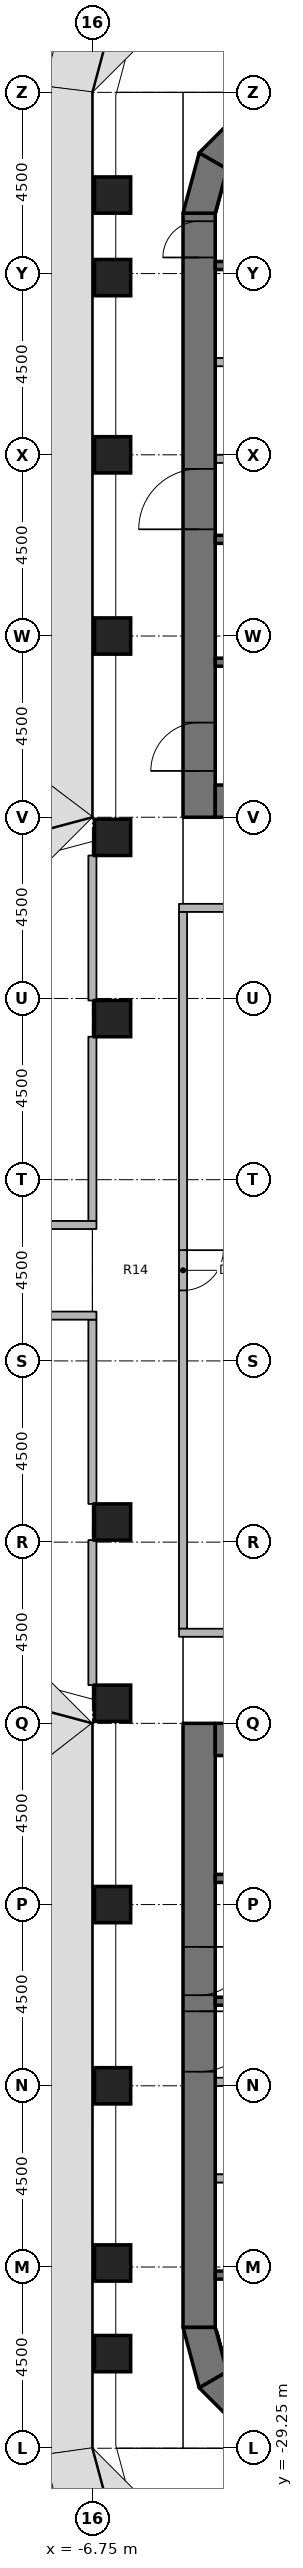
"""IFC4 building model, lengths in metres.
Left out: names, types, materials, properties, quantities, classifications, styles, units other than length and angle.
Written with IfcOpenShell. Run it as: python <this file> out.ifc"""

import sys

from ifc_helpers import new_model, si_unit, direction, frame, frame_2d, origin, origin_2d, place, context, subcontext, project, spatial, polyline, rectangle, outline, extrude, element, fill, save


model = new_model("IFC4")
c1 = context("Model", 3, precision=1e-05, world=origin(), true_north=direction((0.0, 1.0)))
c2 = subcontext(c1, "Body", "Model", "MODEL_VIEW")
j1 = project(units=[si_unit("LENGTHUNIT", "METRE"), si_unit("PLANEANGLEUNIT", "RADIAN")], contexts=[c1])
p1 = place(None, origin())
s1 = spatial("IfcSite", under=j1, at=p1, CompositionType="ELEMENT")
p2 = place(p1, origin())
s2 = spatial("IfcBuilding", under=s1, at=p2, CompositionType="ELEMENT")
p3 = place(p2, frame((0.0, 0.0, 86.6)))
s3 = spatial("IfcBuildingStorey", under=s2, at=p3, CompositionType="ELEMENT", Elevation=86.6)
for number, where, z_axis, x_axis in (
    (1, (-6.25, -26.9, 0.0), (0.0, 0.0, 1.0), (1.0, 0.0, 0.0)),
    (2, (-6.25, -24.65, 0.0), (0.0, 0.0, 1.0), (1.0, 0.0, 0.0)),
    (3, (-6.25, -20.25, 0.0), (0.0, 0.0, 1.0), (1.0, 0.0, 0.0)),
    (4, (-6.25, -15.75, 0.0), (0.0, 0.0, 1.0), (1.0, 0.0, 0.0)),
    (5, (-6.25, -10.75, 0.0), (0.0, 0.0, 1.0), (1.0, 0.0, 0.0)),
    (6, (-6.25, -6.25, 0.0), (0.0, 0.0, 1.0), (1.0, 0.0, 0.0)),
    (7, (-6.25, 6.25, 0.0), (0.0, 0.0, 1.0), (1.0, 0.0, 0.0)),
    (8, (-6.25, 10.75, 0.0), (0.0, 0.0, 1.0), (1.0, 0.0, 0.0)),
    (9, (-6.25, 15.75, 0.0), (0.0, 0.0, 1.0), (1.0, 0.0, 0.0)),
    (10, (-6.25, 20.25, 0.0), (0.0, 0.0, 1.0), (1.0, 0.0, 0.0)),
    (11, (-6.25, 24.65, 0.0), (0.0, 0.0, 1.0), (1.0, 0.0, 0.0)),
    (12, (-6.25, 26.7, 0.0), (0.0, 0.0, 1.0), (1.0, 0.0, 0.0)),
):
    element("IfcColumn", number, at=place(p3, frame(where, z_axis=z_axis, x_axis=x_axis)), inside=s3, PredefinedType="COLUMN", context=c2, shape_type="SweptSolid", body=[
        extrude(rectangle(XDim=0.9, YDim=0.9, at=origin_2d()), origin(), (0.0, 0.0, 1.0), 3.65),
    ])
p4 = place(p3, frame((-4.1, 11.25, 0.0), z_axis=(0.0, 0.0, 1.0), x_axis=(0.0, 1.0, 0.0)))
e13 = element("IfcWall", 13, at=p4, inside=s3, PredefinedType="SHEAR", context=c2, shape_type="SweptSolid", body=[
    extrude(rectangle(XDim=15.0, YDim=0.8, at=frame_2d((7.5, 0.0))), origin(), (0.0, 0.0, 1.0), 3.8),
])
p5 = place(p4, frame((7.15, 0.0, 0.0)))
e14 = element("IfcOpeningElement", 14, at=p5, cuts=e13, PredefinedType="OPENING", context=c2, shape_type="SweptSolid", body=[
    extrude(rectangle(XDim=1.5, YDim=2.3, at=frame_2d((0.75, 1.15))), frame((0.0, 0.41, 0.0), z_axis=(0.0, -1.0, 0.0), x_axis=(1.0, 0.0, 0.0)), (0.0, 0.0, 1.0), 0.82),
])
p6 = place(p4, frame((13.9, 0.0, 0.0)))
e15 = element("IfcOpeningElement", 15, at=p6, cuts=e13, PredefinedType="OPENING", context=c2, shape_type="SweptSolid", body=[
    extrude(rectangle(XDim=0.9, YDim=2.1, at=frame_2d((0.45, 1.05))), frame((0.0, 0.41, 0.0), z_axis=(0.0, -1.0, 0.0), x_axis=(1.0, 0.0, 0.0)), (0.0, 0.0, 1.0), 0.82),
])
p7 = place(p4, frame((1.15, 0.0, 0.0)))
e16 = element("IfcOpeningElement", 16, at=p7, cuts=e13, PredefinedType="OPENING", context=c2, shape_type="SweptSolid", body=[
    extrude(rectangle(XDim=1.2, YDim=2.1, at=frame_2d((0.6, 1.05))), frame((0.0, 0.41, 0.0), z_axis=(0.0, -1.0, 0.0), x_axis=(1.0, 0.0, 0.0)), (0.0, 0.0, 1.0), 0.82),
])
p8 = place(p3, frame((-3.7, 11.65, 0.0), z_axis=(0.0, 0.0, 1.0), x_axis=(1.0, 0.0, 0.0)))
e17 = element("IfcWall", 17, at=p8, inside=s3, PredefinedType="SHEAR", context=c2, shape_type="SweptSolid", body=[
    extrude(rectangle(XDim=7.4, YDim=0.8, at=frame_2d((3.7, 0.0))), origin(), (0.0, 0.0, 1.0), 3.8),
])
p9 = place(p3, origin())
e18 = element("IfcWall", 18, at=p9, inside=s3, PredefinedType="SHEAR", context=c2, shape_type="SweptSolid", body=[
    extrude(outline(polyline([(-4.5, 26.25), (-4.098, 27.75), (-3.405, 27.35), (-3.7, 26.25), (-4.5, 26.25)])), origin(), (0.0, 0.0, 1.0), 3.8),
])
p10 = place(p3, origin())
e19 = element("IfcWall", 19, at=p10, inside=s3, PredefinedType="SHEAR", context=c2, shape_type="SweptSolid", body=[
    extrude(outline(polyline([(-4.098, 27.75), (-3.0, 28.848), (-2.6, 28.155), (-3.405, 27.35), (-4.098, 27.75)])), origin(), (0.0, 0.0, 1.0), 3.8),
])
p11 = place(p3, frame((-4.1, -11.25, 0.0), z_axis=(0.0, 0.0, 1.0), x_axis=(0.0, -1.0, 0.0)))
e20 = element("IfcWall", 20, at=p11, inside=s3, PredefinedType="SHEAR", context=c2, shape_type="SweptSolid", body=[
    extrude(rectangle(XDim=15.0, YDim=0.8, at=frame_2d((7.5, 0.0))), origin(), (0.0, 0.0, 1.0), 3.8),
])
p12 = place(p11, frame((7.15, 0.0, 0.0)))
e21 = element("IfcOpeningElement", 21, at=p12, cuts=e20, PredefinedType="OPENING", context=c2, shape_type="SweptSolid", body=[
    extrude(rectangle(XDim=1.5, YDim=2.3, at=frame_2d((0.75, 1.15))), frame((0.0, 0.41, 0.0), z_axis=(0.0, -1.0, 0.0), x_axis=(1.0, 0.0, 0.0)), (0.0, 0.0, 1.0), 0.82),
])
p13 = place(p11, frame((5.55, 0.0, 0.0)))
e22 = element("IfcOpeningElement", 22, at=p13, cuts=e20, PredefinedType="OPENING", context=c2, shape_type="SweptSolid", body=[
    extrude(rectangle(XDim=1.2, YDim=2.1, at=frame_2d((0.6, 1.05))), frame((0.0, 0.41, 0.0), z_axis=(0.0, -1.0, 0.0), x_axis=(1.0, 0.0, 0.0)), (0.0, 0.0, 1.0), 0.82),
])
p14 = place(p3, frame((-3.7, -11.65, 0.0), z_axis=(0.0, 0.0, 1.0), x_axis=(1.0, 0.0, 0.0)))
e23 = element("IfcWall", 23, at=p14, inside=s3, PredefinedType="SHEAR", context=c2, shape_type="SweptSolid", body=[
    extrude(rectangle(XDim=7.4, YDim=0.8, at=frame_2d((3.7, 0.0))), origin(), (0.0, 0.0, 1.0), 3.8),
])
p15 = place(p3, origin())
e24 = element("IfcWall", 24, at=p15, inside=s3, PredefinedType="SHEAR", context=c2, shape_type="SweptSolid", body=[
    extrude(outline(polyline([(-4.5, -26.25), (-4.098, -27.75), (-3.405, -27.35), (-3.7, -26.25), (-4.5, -26.25)])), origin(), (0.0, 0.0, 1.0), 3.8),
])
p16 = place(p3, origin())
e25 = element("IfcWall", 25, at=p16, inside=s3, PredefinedType="SHEAR", context=c2, shape_type="SweptSolid", body=[
    extrude(outline(polyline([(-4.098, -27.75), (-3.0, -28.848), (-2.6, -28.155), (-3.405, -27.35), (-4.098, -27.75)])), origin(), (0.0, 0.0, 1.0), 3.8),
])
for number, where, z_axis, x_axis in (
    (26, (-3.7, 24.95, 0.0), (0.0, 0.0, 1.0), (1.0, 0.0, 0.0)),
    (27, (-3.7, 18.15, 0.0), (0.0, 0.0, 1.0), (1.0, 0.0, 0.0)),
    (28, (-3.7, 15.1, 0.0), (0.0, 0.0, 1.0), (1.0, 0.0, 0.0)),
):
    element("IfcWall", number, at=place(p3, frame(where, z_axis=z_axis, x_axis=x_axis)), inside=s3, PredefinedType="SHEAR", context=c2, shape_type="SweptSolid", body=[
        extrude(rectangle(XDim=7.4, YDim=0.2, at=frame_2d((3.7, 0.0))), origin(), (0.0, 0.0, 1.0), 3.65),
    ])
p17 = place(p3, frame((-3.7, 20.15, 0.0), z_axis=(0.0, 0.0, 1.0), x_axis=(1.0, 0.0, 0.0)))
e29 = element("IfcWall", 29, at=p17, inside=s3, PredefinedType="PARTITIONING", context=c2, shape_type="SweptSolid", body=[
    extrude(rectangle(XDim=2.8, YDim=0.2, at=frame_2d((1.4, 0.0))), origin(), (0.0, 0.0, 1.0), 3.65),
])
p18 = place(p3, frame((-3.7, 22.55, 0.0), z_axis=(0.0, 0.0, 1.0), x_axis=(1.0, 0.0, 0.0)))
e30 = element("IfcWall", 30, at=p18, inside=s3, PredefinedType="PARTITIONING", context=c2, shape_type="SweptSolid", body=[
    extrude(rectangle(XDim=2.6, YDim=0.2, at=frame_2d((1.3, 0.0))), origin(), (0.0, 0.0, 1.0), 3.65),
])
for number, where, z_axis, x_axis in (
    (31, (3.7, -24.95, 0.0), (0.0, 0.0, 1.0), (-1.0, 0.0, 0.0)),
    (32, (3.7, -18.15, 0.0), (0.0, 0.0, 1.0), (-1.0, 0.0, 0.0)),
    (33, (3.7, -15.1, 0.0), (0.0, 0.0, 1.0), (-1.0, 0.0, 0.0)),
):
    element("IfcWall", number, at=place(p3, frame(where, z_axis=z_axis, x_axis=x_axis)), inside=s3, PredefinedType="SHEAR", context=c2, shape_type="SweptSolid", body=[
        extrude(rectangle(XDim=7.4, YDim=0.2, at=frame_2d((3.7, 0.0))), origin(), (0.0, 0.0, 1.0), 3.65),
    ])
p19 = place(p3, frame((-0.9, -20.15, 0.0), z_axis=(0.0, 0.0, 1.0), x_axis=(-1.0, 0.0, 0.0)))
e34 = element("IfcWall", 34, at=p19, inside=s3, PredefinedType="PARTITIONING", context=c2, shape_type="SweptSolid", body=[
    extrude(rectangle(XDim=2.8, YDim=0.2, at=frame_2d((1.4, 0.0))), origin(), (0.0, 0.0, 1.0), 3.65),
])
p20 = place(p3, frame((-1.1, -22.55, 0.0), z_axis=(0.0, 0.0, 1.0), x_axis=(-1.0, 0.0, 0.0)))
e35 = element("IfcWall", 35, at=p20, inside=s3, PredefinedType="PARTITIONING", context=c2, shape_type="SweptSolid", body=[
    extrude(rectangle(XDim=2.6, YDim=0.2, at=frame_2d((1.3, 0.0))), origin(), (0.0, 0.0, 1.0), 3.65),
])
p21 = place(p3, frame((-4.5, 8.9, 0.0), z_axis=(0.0, 0.0, 1.0), x_axis=(0.0, -1.0, 0.0)))
e36 = element("IfcWall", 36, at=p21, inside=s3, PredefinedType="PARTITIONING", context=c2, shape_type="SweptSolid", body=[
    extrude(rectangle(XDim=17.8, YDim=0.2, at=frame_2d((8.9, 0.0))), origin(), (0.0, 0.0, 1.0), 2.738),
])
p22 = place(p21, frame((8.4, 0.0, 0.0)))
e37 = element("IfcOpeningElement", 37, at=p22, cuts=e36, PredefinedType="OPENING", context=c2, shape_type="SweptSolid", body=[
    extrude(rectangle(XDim=1.0, YDim=2.1, at=frame_2d((0.5, 1.05))), frame((0.0, 0.11, 0.0), z_axis=(0.0, -1.0, 0.0), x_axis=(1.0, 0.0, 0.0)), (0.0, 0.0, 1.0), 0.22),
])
p23 = place(p3, frame((-6.75, 1.225, 0.0), z_axis=(0.0, 0.0, 1.0), x_axis=(0.0, 1.0, 0.0)))
e38 = element("IfcWall", 38, at=p23, inside=s3, PredefinedType="PARTITIONING", context=c2, shape_type="SweptSolid", body=[
    extrude(rectangle(XDim=4.575, YDim=0.2, at=frame_2d((2.288, 0.0))), origin(), (0.0, 0.0, 1.0), 2.738),
])
for number, where, z_axis, x_axis in (
    (39, (-6.75, 6.7, 0.0), (0.0, 0.0, 1.0), (0.0, 1.0, 0.0)),
    (40, (-6.75, -10.3, 0.0), (0.0, 0.0, 1.0), (0.0, 1.0, 0.0)),
):
    element("IfcWall", number, at=place(p3, frame(where, z_axis=z_axis, x_axis=x_axis)), inside=s3, PredefinedType="PARTITIONING", context=c2, shape_type="SweptSolid", body=[
        extrude(rectangle(XDim=3.6, YDim=0.2, at=frame_2d((1.8, 0.0))), origin(), (0.0, 0.0, 1.0), 2.738),
    ])
p24 = place(p3, frame((-6.75, -5.8, 0.0), z_axis=(0.0, 0.0, 1.0), x_axis=(0.0, 1.0, 0.0)))
e41 = element("IfcWall", 41, at=p24, inside=s3, PredefinedType="PARTITIONING", context=c2, shape_type="SweptSolid", body=[
    extrude(rectangle(XDim=4.575, YDim=0.2, at=frame_2d((2.288, 0.0))), origin(), (0.0, 0.0, 1.0), 2.738),
])
for number, where, z_axis, x_axis in (
    (42, (-4.6, 9.0, 0.0), (0.0, 0.0, 1.0), (1.0, 0.0, 0.0)),
    (43, (-4.6, -9.0, 0.0), (0.0, 0.0, 1.0), (1.0, 0.0, 0.0)),
):
    element("IfcWall", number, at=place(p3, frame(where, z_axis=z_axis, x_axis=x_axis)), inside=s3, PredefinedType="PARTITIONING", context=c2, shape_type="SweptSolid", body=[
        extrude(rectangle(XDim=4.7, YDim=0.2, at=frame_2d((2.35, 0.0))), origin(), (0.0, 0.0, 1.0), 2.738),
    ])
p25 = place(p3, frame((-11.35, 1.125, 0.0), z_axis=(0.0, 0.0, 1.0), x_axis=(1.0, 0.0, 0.0)))
e44 = element("IfcWall", 44, at=p25, inside=s3, PredefinedType="PARTITIONING", context=c2, shape_type="SweptSolid", body=[
    extrude(rectangle(XDim=4.7, YDim=0.2, at=frame_2d((2.35, 0.0))), origin(), (0.0, 0.0, 1.0), 2.738),
])
p26 = place(p25, frame((1.85, 0.0, 0.0)))
e45 = element("IfcOpeningElement", 45, at=p26, cuts=e44, PredefinedType="OPENING", context=c2, shape_type="SweptSolid", body=[
    extrude(rectangle(XDim=1.0, YDim=2.1, at=frame_2d((0.5, 1.05))), frame((0.0, 0.11, 0.0), z_axis=(0.0, -1.0, 0.0), x_axis=(1.0, 0.0, 0.0)), (0.0, 0.0, 1.0), 0.22),
])
p27 = place(p3, frame((-6.65, -1.125, 0.0), z_axis=(0.0, 0.0, 1.0), x_axis=(-1.0, 0.0, 0.0)))
e46 = element("IfcWall", 46, at=p27, inside=s3, PredefinedType="PARTITIONING", context=c2, shape_type="SweptSolid", body=[
    extrude(rectangle(XDim=4.7, YDim=0.2, at=frame_2d((2.35, 0.0))), origin(), (0.0, 0.0, 1.0), 2.738),
])
p28 = place(p27, frame((1.85, 0.0, 0.0)))
e47 = element("IfcOpeningElement", 47, at=p28, cuts=e46, PredefinedType="OPENING", context=c2, shape_type="SweptSolid", body=[
    extrude(rectangle(XDim=1.0, YDim=2.1, at=frame_2d((0.5, 1.05))), frame((0.0, 0.11, 0.0), z_axis=(0.0, -1.0, 0.0), x_axis=(1.0, 0.0, 0.0)), (0.0, 0.0, 1.0), 0.22),
])
p29 = place(p5, origin())
e48 = element("IfcDoor", 48, at=p29, inside=s3, OperationType="DOUBLE_DOOR_SINGLE_SWING", PredefinedType="DOOR", context=c2, shape_type="SweptSolid", body=[
    extrude(rectangle(XDim=1.5, YDim=2.3, at=frame_2d((0.75, 1.15))), frame((0.0, 0.025, 0.0), z_axis=(0.0, -1.0, 0.0), x_axis=(1.0, 0.0, 0.0)), (0.0, 0.0, 1.0), 0.05),
])
fill(e14, e48)
p30 = place(p6, origin())
e49 = element("IfcDoor", 49, at=p30, inside=s3, OperationType="SINGLE_SWING_RIGHT", PredefinedType="DOOR", context=c2, shape_type="SweptSolid", body=[
    extrude(rectangle(XDim=0.9, YDim=2.1, at=frame_2d((0.45, 1.05))), frame((0.0, 0.025, 0.0), z_axis=(0.0, -1.0, 0.0), x_axis=(1.0, 0.0, 0.0)), (0.0, 0.0, 1.0), 0.05),
])
fill(e15, e49)
p31 = place(p7, origin())
e50 = element("IfcDoor", 50, at=p31, inside=s3, OperationType="SINGLE_SWING_RIGHT", PredefinedType="DOOR", context=c2, shape_type="SweptSolid", body=[
    extrude(rectangle(XDim=1.2, YDim=2.1, at=frame_2d((0.6, 1.05))), frame((0.0, 0.025, 0.0), z_axis=(0.0, -1.0, 0.0), x_axis=(1.0, 0.0, 0.0)), (0.0, 0.0, 1.0), 0.05),
])
fill(e16, e50)
p32 = place(p12, origin())
e51 = element("IfcDoor", 51, at=p32, inside=s3, OperationType="DOUBLE_DOOR_SINGLE_SWING", PredefinedType="DOOR", context=c2, shape_type="SweptSolid", body=[
    extrude(rectangle(XDim=1.5, YDim=2.3, at=frame_2d((0.75, 1.15))), frame((0.0, 0.025, 0.0), z_axis=(0.0, -1.0, 0.0), x_axis=(1.0, 0.0, 0.0)), (0.0, 0.0, 1.0), 0.05),
])
fill(e21, e51)
p33 = place(p13, origin())
e52 = element("IfcDoor", 52, at=p33, inside=s3, OperationType="SINGLE_SWING_RIGHT", PredefinedType="DOOR", context=c2, shape_type="SweptSolid", body=[
    extrude(rectangle(XDim=1.2, YDim=2.1, at=frame_2d((0.6, 1.05))), frame((0.0, 0.025, 0.0), z_axis=(0.0, -1.0, 0.0), x_axis=(1.0, 0.0, 0.0)), (0.0, 0.0, 1.0), 0.05),
])
fill(e22, e52)
p34 = place(p22, origin())
e53 = element("IfcDoor", 53, at=p34, inside=s3, OperationType="SINGLE_SWING_RIGHT", PredefinedType="DOOR", context=c2, shape_type="SweptSolid", body=[
    extrude(rectangle(XDim=1.0, YDim=2.1, at=frame_2d((0.5, 1.05))), frame((0.0, 0.025, 0.0), z_axis=(0.0, -1.0, 0.0), x_axis=(1.0, 0.0, 0.0)), (0.0, 0.0, 1.0), 0.05),
])
fill(e37, e53)
save(model, sys.argv[1])
